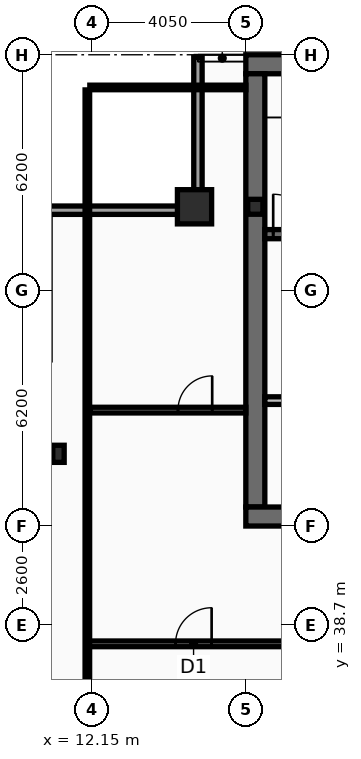
"""IFC4 building model, lengths in metres.
Left out: names, types, materials, properties, quantities, classifications, styles, units other than length and angle.
Written with IfcOpenShell. Run it as: python <this file> out.ifc"""

import sys

from ifc_helpers import new_model, si_unit, direction, frame, frame_2d, origin, origin_2d, place, context, subcontext, project, spatial, rectangle, hollow_rectangle, i_section, extrude, element, fill, save


model = new_model("IFC4")
c1 = context("Model", 3, precision=1e-05, world=origin(), true_north=direction((0.0, 1.0)))
c2 = subcontext(c1, "Body", "Model", "MODEL_VIEW")
j1 = project(units=[si_unit("LENGTHUNIT", "METRE"), si_unit("PLANEANGLEUNIT", "RADIAN")], contexts=[c1])
p1 = place(None, origin())
s1 = spatial("IfcSite", under=j1, at=p1, CompositionType="ELEMENT")
p2 = place(p1, origin())
s2 = spatial("IfcBuilding", under=s1, at=p2, CompositionType="ELEMENT")
p3 = place(p2, frame((0.0, 0.0, 332.6)))
s3 = spatial("IfcBuildingStorey", under=s2, at=p3, CompositionType="ELEMENT", Elevation=332.6)
p4 = place(p3, frame((16.2, 53.45, 0.0), z_axis=(0.0, 0.0, 1.0), x_axis=(1.0, 0.0, 0.0)))
e1 = element("IfcWall", 1, at=p4, inside=s3, PredefinedType="SHEAR", context=c2, shape_type="SweptSolid", body=[
    extrude(rectangle(XDim=40.5, YDim=0.5, at=frame_2d((20.25, 0.0))), origin(), (0.0, 0.0, 1.0), 3.44),
])
p5 = place(p3, frame((16.45, 41.8, 0.0), z_axis=(0.0, 0.0, 1.0), x_axis=(0.0, 1.0, 0.0)))
e2 = element("IfcWall", 2, at=p5, inside=s3, PredefinedType="SHEAR", context=c2, shape_type="SweptSolid", body=[
    extrude(rectangle(XDim=11.4, YDim=0.5, at=frame_2d((5.7, 0.0))), origin(), (0.0, 0.0, 1.0), 3.44),
])
p6 = place(p3, frame((18.65, 41.55, 0.0), z_axis=(0.0, 0.0, 1.0), x_axis=(-1.0, 0.0, 0.0)))
e3 = element("IfcWall", 3, at=p6, inside=s3, PredefinedType="SHEAR", context=c2, shape_type="SweptSolid", body=[
    extrude(rectangle(XDim=2.45, YDim=0.5, at=frame_2d((1.225, 0.0))), origin(), (0.0, 0.0, 1.0), 3.44),
])
p7 = place(p3, frame((16.7, 48.98, 0.0), z_axis=(0.0, 0.0, 1.0), x_axis=(1.0, 0.0, 0.0)))
e4 = element("IfcWall", 4, at=p7, inside=s3, PredefinedType="SHEAR", context=c2, shape_type="SweptSolid", body=[
    extrude(rectangle(XDim=7.52, YDim=0.24, at=frame_2d((3.76, 0.0))), origin(), (0.0, 0.0, 1.0), 3.44),
])
p8 = place(p7, frame((0.22, 0.0, 0.0)))
e5 = element("IfcOpeningElement", 5, at=p8, cuts=e4, PredefinedType="OPENING", context=c2, shape_type="SweptSolid", body=[
    extrude(rectangle(XDim=1.05, YDim=2.15, at=frame_2d((0.525, 1.075))), frame((0.0, 0.13, 0.0), z_axis=(0.0, -1.0, 0.0), x_axis=(1.0, 0.0, 0.0)), (0.0, 0.0, 1.0), 0.26),
])
p9 = place(p3, frame((14.85, 49.7, 0.0), z_axis=(0.0, 0.0, 1.0), x_axis=(1.0, 0.0, 0.0)))
e6 = element("IfcColumn", 6, at=p9, inside=s3, PredefinedType="COLUMN", context=c2, shape_type="SweptSolid", body=[
    extrude(hollow_rectangle(XDim=0.9, YDim=0.9, WallThickness=0.05, at=origin_2d()), origin(), (0.0, 0.0, 1.0), 3.6),
])
p10 = place(p3, frame((11.27, 43.2, 0.0), z_axis=(0.0, 0.0, 1.0), x_axis=(1.0, 0.0, 0.0)))
e7 = element("IfcColumn", 7, at=p10, inside=s3, PredefinedType="COLUMN", context=c2, shape_type="SweptSolid", body=[
    extrude(i_section(OverallWidth=0.3, OverallDepth=0.45, WebThickness=0.014, FlangeThickness=0.026, at=origin_2d()), origin(), (0.0, 0.0, 1.0), 3.6),
])
p11 = place(p3, frame((16.45, 49.7, 0.0), z_axis=(0.0, 0.0, 1.0), x_axis=(1.0, 0.0, 0.0)))
e8 = element("IfcColumn", 8, at=p11, inside=s3, PredefinedType="COLUMN", context=c2, shape_type="SweptSolid", body=[
    extrude(i_section(OverallWidth=0.399, OverallDepth=0.393, WebThickness=0.023, FlangeThickness=0.037, at=origin_2d()), origin(), (0.0, 0.0, 1.0), 3.6),
])
p12 = place(p3, frame((10.83, 49.61, 0.0), z_axis=(0.0, 0.0, 1.0), x_axis=(1.0, 0.0, 0.0)))
e9 = element("IfcWall", 9, at=p12, inside=s3, PredefinedType="SOLIDWALL", context=c2, shape_type="SweptSolid", body=[
    extrude(rectangle(XDim=4.22, YDim=0.22, at=frame_2d((2.11, 0.0))), origin(), (0.0, 0.0, 1.0), 2.88),
])
p13 = place(p3, frame((14.94, 49.72, 0.0), z_axis=(0.0, 0.0, 1.0), x_axis=(0.0, 1.0, 0.0)))
e10 = element("IfcWall", 10, at=p13, inside=s3, PredefinedType="SOLIDWALL", context=c2, shape_type="SweptSolid", body=[
    extrude(rectangle(XDim=3.91, YDim=0.22, at=frame_2d((1.955, 0.0))), origin(), (0.0, 0.0, 1.0), 2.88),
])
p14 = place(p3, frame((16.7, 44.6, 0.0), z_axis=(0.0, 0.0, 1.0), x_axis=(1.0, 0.0, 0.0)))
e11 = element("IfcWall", 11, at=p14, inside=s3, PredefinedType="PARTITIONING", context=c2, shape_type="SweptSolid", body=[
    extrude(rectangle(XDim=4.3, YDim=0.2, at=frame_2d((2.15, 0.0))), origin(), (0.0, 0.0, 1.0), 3.44),
])
p15 = place(p14, frame((1.25, 0.0, 0.0)))
e12 = element("IfcOpeningElement", 12, at=p15, cuts=e11, PredefinedType="OPENING", context=c2, shape_type="SweptSolid", body=[
    extrude(rectangle(XDim=1.05, YDim=2.15, at=frame_2d((0.525, 1.075))), frame((0.0, 0.11, 0.0), z_axis=(0.0, -1.0, 0.0), x_axis=(1.0, 0.0, 0.0)), (0.0, 0.0, 1.0), 0.22),
])
p16 = place(p3, frame((12.03, 38.2, 0.0), z_axis=(0.0, 0.0, 1.0), x_axis=(1.0, 0.0, 0.0)))
e13 = element("IfcWall", 13, at=p16, inside=s3, PredefinedType="PARTITIONING", context=c2, shape_type="SweptSolid", body=[
    extrude(rectangle(XDim=6.52, YDim=0.15, at=frame_2d((3.26, 0.0))), origin(), (0.0, 0.0, 1.0), 2.83),
])
p17 = place(p16, frame((2.32, 0.0, 0.0)))
e14 = element("IfcOpeningElement", 14, at=p17, cuts=e13, PredefinedType="OPENING", context=c2, shape_type="SweptSolid", body=[
    extrude(rectangle(XDim=0.95, YDim=2.05, at=frame_2d((0.475, 1.025))), frame((0.0, 0.085, 0.0), z_axis=(0.0, -1.0, 0.0), x_axis=(1.0, 0.0, 0.0)), (0.0, 0.0, 1.0), 0.17),
])
p18 = place(p3, frame((12.095, 44.35, 0.0), z_axis=(0.0, 0.0, 1.0), x_axis=(1.0, 0.0, 0.0)))
e15 = element("IfcWall", 15, at=p18, inside=s3, PredefinedType="PARTITIONING", context=c2, shape_type="SweptSolid", body=[
    extrude(rectangle(XDim=4.105, YDim=0.15, at=frame_2d((2.052, 0.0))), origin(), (0.0, 0.0, 1.0), 2.88),
])
p19 = place(p18, frame((2.32, 0.0, 0.0)))
e16 = element("IfcOpeningElement", 16, at=p19, cuts=e15, PredefinedType="OPENING", context=c2, shape_type="SweptSolid", body=[
    extrude(rectangle(XDim=0.9, YDim=2.05, at=frame_2d((0.45, 1.025))), frame((0.0, 0.085, 0.0), z_axis=(0.0, -1.0, 0.0), x_axis=(1.0, 0.0, 0.0)), (0.0, 0.0, 1.0), 0.17),
])
p20 = place(p3, frame((12.03, 10.665, 0.0), z_axis=(0.0, 0.0, 1.0), x_axis=(0.0, 1.0, 0.0)))
e17 = element("IfcWall", 17, at=p20, inside=s3, PredefinedType="PARTITIONING", context=c2, shape_type="SweptSolid", body=[
    extrude(rectangle(XDim=42.11, YDim=0.12, at=frame_2d((21.055, 0.0))), origin(), (0.0, 0.0, 1.0), 2.83),
])
p21 = place(p3, frame((12.095, 52.84, 0.0), z_axis=(0.0, 0.0, 1.0), x_axis=(1.0, 0.0, 0.0)))
e18 = element("IfcWall", 18, at=p21, inside=s3, PredefinedType="PARTITIONING", context=c2, shape_type="SweptSolid", body=[
    extrude(rectangle(XDim=4.105, YDim=0.12, at=frame_2d((2.052, 0.0))), origin(), (0.0, 0.0, 1.0), 3.44),
])
p22 = place(p8, origin())
e19 = element("IfcDoor", 19, at=p22, inside=s3, OperationType="SINGLE_SWING_LEFT", PredefinedType="DOOR", context=c2, shape_type="SweptSolid", body=[
    extrude(rectangle(XDim=1.05, YDim=2.15, at=frame_2d((0.525, 1.075))), frame((0.0, 0.025, 0.0), z_axis=(0.0, -1.0, 0.0), x_axis=(1.0, 0.0, 0.0)), (0.0, 0.0, 1.0), 0.05),
])
fill(e5, e19)
p23 = place(p17, origin())
e20 = element("IfcDoor", 20, at=p23, inside=s3, OperationType="SINGLE_SWING_RIGHT", PredefinedType="DOOR", context=c2, shape_type="SweptSolid", body=[
    extrude(rectangle(XDim=0.95, YDim=2.05, at=frame_2d((0.475, 1.025))), frame((0.0, 0.025, 0.0), z_axis=(0.0, -1.0, 0.0), x_axis=(1.0, 0.0, 0.0)), (0.0, 0.0, 1.0), 0.05),
])
fill(e14, e20)
p24 = place(p19, origin())
e21 = element("IfcDoor", 21, at=p24, inside=s3, OperationType="SINGLE_SWING_RIGHT", PredefinedType="DOOR", context=c2, shape_type="SweptSolid", body=[
    extrude(rectangle(XDim=0.9, YDim=2.05, at=frame_2d((0.45, 1.025))), frame((0.0, 0.025, 0.0), z_axis=(0.0, -1.0, 0.0), x_axis=(1.0, 0.0, 0.0)), (0.0, 0.0, 1.0), 0.05),
])
fill(e16, e21)
save(model, sys.argv[1])
